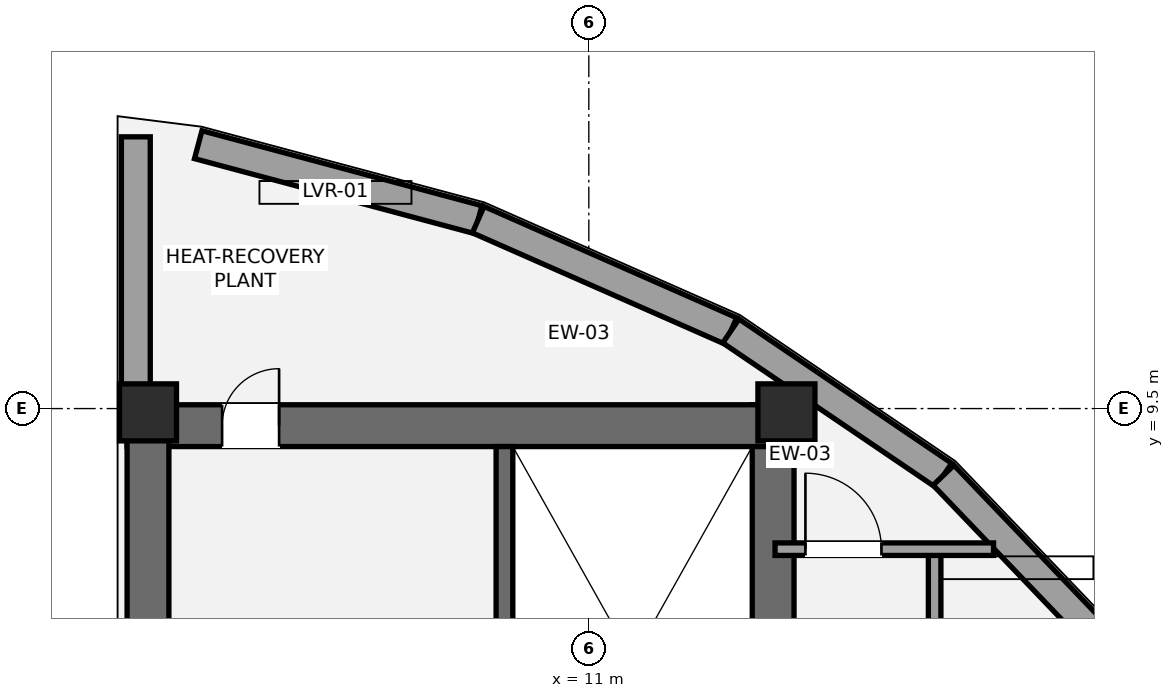
"""IFC4 building model, lengths in metres.
Left out: names, types, materials, properties, quantities, classifications, styles, units other than length and angle.
Written with IfcOpenShell. Run it as: python <this file> out.ifc"""

import sys

from ifc_helpers import new_model, si_unit, direction, frame, frame_2d, origin, origin_2d, place, context, subcontext, project, spatial, rectangle, extrude, element, fill, save


model = new_model("IFC4")
c1 = context("Model", 3, precision=1e-05, world=origin(), true_north=direction((0.0, 1.0)))
c2 = subcontext(c1, "Body", "Model", "MODEL_VIEW")
j1 = project(units=[si_unit("LENGTHUNIT", "METRE"), si_unit("PLANEANGLEUNIT", "RADIAN")], contexts=[c1])
p1 = place(None, origin())
s1 = spatial("IfcSite", under=j1, at=p1, CompositionType="ELEMENT")
p2 = place(p1, origin())
s2 = spatial("IfcBuilding", under=s1, at=p2, CompositionType="ELEMENT")
p3 = place(p2, frame((0.0, 0.0, 288.2)))
s3 = spatial("IfcBuildingStorey", under=s2, at=p3, CompositionType="ELEMENT", Elevation=288.2)
p4 = place(p3, frame((13.425, 1.3, 0.0), z_axis=(0.0, 0.0, 1.0), x_axis=(0.0, 1.0, 0.0)))
e1 = element("IfcWall", 1, at=p4, inside=s3, PredefinedType="SHEAR", context=c2, shape_type="SweptSolid", body=[
    extrude(rectangle(XDim=8.25, YDim=0.55, at=frame_2d((4.125, 0.0))), origin(), (0.0, 0.0, 1.0), 3.8),
])
p5 = place(p3, frame((4.925, 9.275, 0.0), z_axis=(0.0, 0.0, 1.0), x_axis=(1.0, 0.0, 0.0)))
e2 = element("IfcWall", 2, at=p5, inside=s3, PredefinedType="SHEAR", context=c2, shape_type="SweptSolid", body=[
    extrude(rectangle(XDim=8.775, YDim=0.55, at=frame_2d((4.387, 0.0))), origin(), (0.0, 0.0, 1.0), 3.8),
])
p6 = place(p5, frame((1.25, 0.0, 0.0)))
e3 = element("IfcOpeningElement", 3, at=p6, cuts=e2, PredefinedType="OPENING", context=c2, shape_type="SweptSolid", body=[
    extrude(rectangle(XDim=0.75, YDim=2.1, at=frame_2d((0.375, 1.05))), frame((0.0, 0.285, 0.0), z_axis=(0.0, -1.0, 0.0), x_axis=(1.0, 0.0, 0.0)), (0.0, 0.0, 1.0), 0.57),
])
p7 = place(p3, frame((5.2, 1.3, 0.0), z_axis=(0.0, 0.0, 1.0), x_axis=(0.0, 1.0, 0.0)))
e4 = element("IfcWall", 4, at=p7, inside=s3, PredefinedType="SHEAR", context=c2, shape_type="SweptSolid", body=[
    extrude(rectangle(XDim=8.25, YDim=0.55, at=frame_2d((4.125, 0.0))), origin(), (0.0, 0.0, 1.0), 3.8),
])
p8 = place(p3, frame((9.89, 1.85, 0.0), z_axis=(0.0, 0.0, 1.0), x_axis=(0.0, 1.0, 0.0)))
e5 = element("IfcWall", 5, at=p8, inside=s3, PredefinedType="SHEAR", context=c2, shape_type="SweptSolid", body=[
    extrude(rectangle(XDim=7.15, YDim=0.22, at=frame_2d((3.575, 0.0))), origin(), (0.0, 0.0, 1.0), 3.8),
])
for number, where, z_axis, x_axis in (
    (6, (5.2, 9.45, 0.0), (0.0, 0.0, 1.0), (1.0, 0.0, 0.0)),
    (7, (13.6, 9.45, 0.0), (0.0, 0.0, 1.0), (1.0, 0.0, 0.0)),
):
    element("IfcColumn", number, at=place(p3, frame(where, z_axis=z_axis, x_axis=x_axis)), inside=s3, PredefinedType="PILASTER", context=c2, shape_type="SweptSolid", body=[
        extrude(rectangle(XDim=0.75, YDim=0.75, at=origin_2d()), origin(), (0.0, 0.0, 1.0), 3.8),
    ])
p9 = place(p3, frame((9.545, 11.986, 0.0), z_axis=(0.0, 0.0, 1.0), x_axis=(-0.965986900467, 0.2585910055, 0.0)))
e8 = element("IfcWall", 8, at=p9, inside=s3, PredefinedType="ELEMENTEDWALL", context=c2, shape_type="SweptSolid", body=[
    extrude(rectangle(XDim=3.813, YDim=0.38, at=frame_2d((1.907, 0.0))), origin(), (0.0, 0.0, 1.0), 3.02),
])
p10 = place(p3, frame((12.869, 10.521, 0.0), z_axis=(0.0, 0.0, 1.0), x_axis=(-0.915153428526, 0.403105696137, 0.0)))
e9 = element("IfcWall", 9, at=p10, inside=s3, PredefinedType="ELEMENTEDWALL", context=c2, shape_type="SweptSolid", body=[
    extrude(rectangle(XDim=3.633, YDim=0.38, at=frame_2d((1.816, 0.0))), origin(), (0.0, 0.0, 1.0), 3.02),
])
p11 = place(p3, frame((15.667, 8.623, 0.0), z_axis=(0.0, 0.0, 1.0), x_axis=(-0.827602756671, 0.561314241001, 0.0)))
e10 = element("IfcWall", 10, at=p11, inside=s3, PredefinedType="ELEMENTEDWALL", context=c2, shape_type="SweptSolid", body=[
    extrude(rectangle(XDim=3.381, YDim=0.38, at=frame_2d((1.691, 0.0))), origin(), (0.0, 0.0, 1.0), 3.02),
])
p12 = place(p3, frame((17.813, 6.382, 0.0), z_axis=(0.0, 0.0, 1.0), x_axis=(-0.691554901652, 0.722323901031, 0.0)))
e11 = element("IfcWall", 11, at=p12, inside=s3, PredefinedType="ELEMENTEDWALL", context=c2, shape_type="SweptSolid", body=[
    extrude(rectangle(XDim=3.103, YDim=0.38, at=frame_2d((1.551, 0.0))), origin(), (0.0, 0.0, 1.0), 3.02),
])
p13 = place(p3, frame((5.04, 13.075, 0.0), z_axis=(0.0, 0.0, 1.0), x_axis=(0.0, -1.0, 0.0)))
e12 = element("IfcWall", 12, at=p13, inside=s3, PredefinedType="ELEMENTEDWALL", context=c2, shape_type="SweptSolid", body=[
    extrude(rectangle(XDim=3.445, YDim=0.38, at=frame_2d((1.723, 0.0))), origin(), (0.0, 0.0, 1.0), 3.02),
])
p14 = place(p3, frame((15.55, -7.05, 0.0), z_axis=(0.0, 0.0, 1.0), x_axis=(0.0, 1.0, 0.0)))
e13 = element("IfcWall", 13, at=p14, inside=s3, PredefinedType="PARTITIONING", context=c2, shape_type="SweptSolid", body=[
    extrude(rectangle(XDim=14.7, YDim=0.165, at=frame_2d((7.35, 0.0))), origin(), (0.0, 0.0, 1.0), 3.037),
])
p15 = place(p14, frame((5.78, 0.0, 0.0)))
e14 = element("IfcOpeningElement", 14, at=p15, cuts=e13, PredefinedType="OPENING", context=c2, shape_type="SweptSolid", body=[
    extrude(rectangle(XDim=1.0, YDim=2.15, at=frame_2d((0.5, 1.075))), frame((0.0, 0.093, 0.0), z_axis=(0.0, -1.0, 0.0), x_axis=(1.0, 0.0, 0.0)), (0.0, 0.0, 1.0), 0.185),
])
p16 = place(p3, frame((13.45, 7.65, 0.0), z_axis=(0.0, 0.0, 1.0), x_axis=(1.0, 0.0, 0.0)))
e15 = element("IfcWall", 15, at=p16, inside=s3, PredefinedType="PARTITIONING", context=c2, shape_type="SweptSolid", body=[
    extrude(rectangle(XDim=2.875, YDim=0.165, at=frame_2d((1.438, 0.0))), origin(), (0.0, 0.0, 1.0), 3.018),
])
p17 = place(p16, frame((0.4, 0.0, 0.0)))
e16 = element("IfcOpeningElement", 16, at=p17, cuts=e15, PredefinedType="OPENING", context=c2, shape_type="SweptSolid", body=[
    extrude(rectangle(XDim=1.0, YDim=2.15, at=frame_2d((0.5, 1.075))), frame((0.0, 0.093, 0.0), z_axis=(0.0, -1.0, 0.0), x_axis=(1.0, 0.0, 0.0)), (0.0, 0.0, 1.0), 0.185),
])
p18 = place(p6, origin())
e17 = element("IfcDoor", 17, at=p18, inside=s3, OperationType="SINGLE_SWING_RIGHT", PredefinedType="DOOR", context=c2, shape_type="SweptSolid", body=[
    extrude(rectangle(XDim=0.75, YDim=2.1, at=frame_2d((0.375, 1.05))), frame((0.0, 0.025, 0.0), z_axis=(0.0, -1.0, 0.0), x_axis=(1.0, 0.0, 0.0)), (0.0, 0.0, 1.0), 0.05),
])
fill(e3, e17)
p19 = place(p17, origin())
e18 = element("IfcDoor", 18, at=p19, inside=s3, OperationType="SINGLE_SWING_LEFT", PredefinedType="DOOR", context=c2, shape_type="SweptSolid", body=[
    extrude(rectangle(XDim=1.0, YDim=2.15, at=frame_2d((0.5, 1.075))), frame((0.0, 0.025, 0.0), z_axis=(0.0, -1.0, 0.0), x_axis=(1.0, 0.0, 0.0)), (0.0, 0.0, 1.0), 0.05),
])
fill(e16, e18)
save(model, sys.argv[1])
